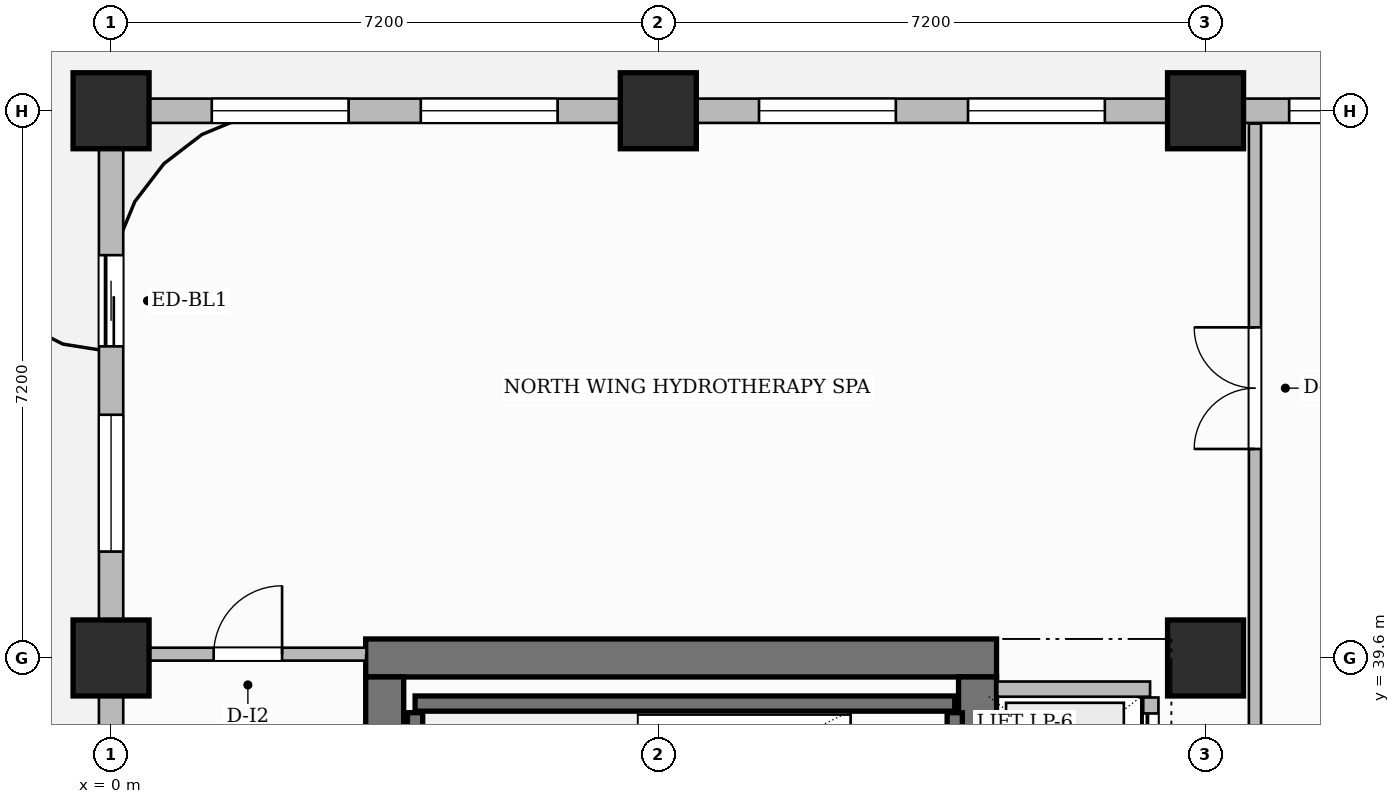
"""IFC4 building model, lengths in metres.
Left out: names, types, materials, properties, quantities, classifications, styles, units other than length and angle.
Written with IfcOpenShell. Run it as: python <this file> out.ifc"""

import sys

from ifc_helpers import new_model, si_unit, direction, frame, frame_2d, origin, origin_2d, place, context, subcontext, project, spatial, rectangle, extrude, source, transform, mapped, element, fill, save


model = new_model("IFC4")
c1 = context("Model", 3, precision=1e-05, world=origin(), true_north=direction((0.0, 1.0)))
c2 = subcontext(c1, "Body", "Model", "MODEL_VIEW")
j1 = project(units=[si_unit("LENGTHUNIT", "METRE"), si_unit("PLANEANGLEUNIT", "RADIAN")], contexts=[c1])
p1 = place(None, origin())
s1 = spatial("IfcSite", under=j1, at=p1, CompositionType="ELEMENT")
p2 = place(p1, origin())
s2 = spatial("IfcBuilding", under=s1, at=p2, CompositionType="ELEMENT")
p3 = place(p2, frame((0.0, 0.0, 184.95)))
s3 = spatial("IfcBuildingStorey", under=s2, at=p3, CompositionType="ELEMENT", Elevation=184.95)
p4 = place(p3, frame((3.35, 39.6, 0.0), z_axis=(0.0, 0.0, 1.0), x_axis=(1.0, 0.0, 0.0)))
e1 = element("IfcWall", 1, at=p4, inside=s3, PredefinedType="SHEAR", context=c2, shape_type="SweptSolid", body=[
    extrude(rectangle(XDim=8.3, YDim=0.5, at=frame_2d((4.15, 0.0))), origin(), (0.0, 0.0, 1.0), 3.85),
])
p5 = place(p3, frame((3.6, 25.45, 0.0), z_axis=(0.0, 0.0, 1.0), x_axis=(0.0, 1.0, 0.0)))
e2 = element("IfcWall", 2, at=p5, inside=s3, PredefinedType="SHEAR", context=c2, shape_type="SweptSolid", body=[
    extrude(rectangle(XDim=13.9, YDim=0.5, at=frame_2d((6.95, 0.0))), origin(), (0.0, 0.0, 1.0), 3.85),
])
p6 = place(p3, frame((11.4, 25.45, 0.0), z_axis=(0.0, 0.0, 1.0), x_axis=(0.0, 1.0, 0.0)))
e3 = element("IfcWall", 3, at=p6, inside=s3, PredefinedType="SHEAR", context=c2, shape_type="SweptSolid", body=[
    extrude(rectangle(XDim=13.9, YDim=0.5, at=frame_2d((6.95, 0.0))), origin(), (0.0, 0.0, 1.0), 3.85),
])
p7 = place(p6, frame((6.52, 0.0, 0.0)))
e4 = element("IfcOpeningElement", 4, at=p7, cuts=e3, PredefinedType="OPENING", context=c2, shape_type="SweptSolid", body=[
    extrude(rectangle(XDim=1.5, YDim=2.2, at=frame_2d((0.75, 1.1))), frame((0.0, 0.26, 0.0), z_axis=(0.0, -1.0, 0.0), x_axis=(1.0, 0.0, 0.0)), (0.0, 0.0, 1.0), 0.52),
])
m1 = source(origin(), c2, "Body", "SweptSolid", [
    extrude(rectangle(XDim=1.0, YDim=1.0, at=origin_2d()), origin(), (0.0, 0.0, 1.0), 3.85),
])
for number, where, z_axis, x_axis in (
    (5, (0.0, 39.6, 0.0), (0.0, 0.0, 1.0), (1.0, 0.0, 0.0)),
    (6, (0.0, 46.8, 0.0), (0.0, 0.0, 1.0), (1.0, 0.0, 0.0)),
    (7, (7.2, 46.8, 0.0), (0.0, 0.0, 1.0), (1.0, 0.0, 0.0)),
    (8, (14.4, 39.6, 0.0), (0.0, 0.0, 1.0), (1.0, 0.0, 0.0)),
    (9, (14.4, 46.8, 0.0), (0.0, 0.0, 1.0), (1.0, 0.0, 0.0)),
):
    element("IfcColumn", number, at=place(p3, frame(where, z_axis=z_axis, x_axis=x_axis)), inside=s3, PredefinedType="COLUMN", context=c2, shape_type="MappedRepresentation", body=[
        mapped(m1, transform((0.0, 0.0, 0.0), scale=1.0)),
    ])
p8 = place(p3, frame((4.0, 39.0, 0.0), z_axis=(0.0, 0.0, 1.0), x_axis=(1.0, 0.0, 0.0)))
e10 = element("IfcWall", 10, at=p8, inside=s3, PredefinedType="SHEAR", context=c2, shape_type="SweptSolid", body=[
    extrude(rectangle(XDim=7.1, YDim=0.2, at=frame_2d((3.55, 0.0))), origin(), (0.0, 0.0, 1.0), 3.85),
])
for number, where, z_axis, x_axis in (
    (11, (4.0, 36.18, 0.0), (0.0, 0.0, 1.0), (0.0, 1.0, 0.0)),
    (12, (11.1, 36.18, 0.0), (0.0, 0.0, 1.0), (0.0, 1.0, 0.0)),
):
    element("IfcWall", number, at=place(p3, frame(where, z_axis=z_axis, x_axis=x_axis)), inside=s3, PredefinedType="SHEAR", context=c2, shape_type="SweptSolid", body=[
        extrude(rectangle(XDim=2.7, YDim=0.2, at=frame_2d((1.35, 0.0))), origin(), (0.0, 0.0, 1.0), 3.85),
    ])
p9 = place(p3, frame((11.66, 39.19, 0.0), z_axis=(0.0, 0.0, 1.0), x_axis=(1.0, 0.0, 0.0)))
e13 = element("IfcWall", 13, at=p9, inside=s3, PredefinedType="PARTITIONING", context=c2, shape_type="SweptSolid", body=[
    extrude(rectangle(XDim=2.01, YDim=0.2, at=frame_2d((1.005, 0.0))), origin(), (0.0, 0.0, 1.0), 3.6),
])
p10 = place(p3, frame((13.68, 34.36, 0.0), z_axis=(0.0, 0.0, 1.0), x_axis=(0.0, 1.0, 0.0)))
e14 = element("IfcWall", 14, at=p10, inside=s3, PredefinedType="PARTITIONING", context=c2, shape_type="SweptSolid", body=[
    extrude(rectangle(XDim=4.72, YDim=0.2, at=frame_2d((2.36, 0.0))), origin(), (0.0, 0.0, 1.0), 3.6),
])
p11 = place(p10, frame((0.21, 0.0, 0.0)))
e15 = element("IfcOpeningElement", 15, at=p11, cuts=e14, PredefinedType="OPENING", context=c2, shape_type="SweptSolid", body=[
    extrude(rectangle(XDim=1.1, YDim=2.2, at=frame_2d((0.55, 1.1))), frame((0.0, 0.11, 0.0), z_axis=(0.0, -1.0, 0.0), x_axis=(1.0, 0.0, 0.0)), (0.0, 0.0, 1.0), 0.22),
])
p12 = place(p10, frame((1.81, 0.0, 0.0)))
e16 = element("IfcOpeningElement", 16, at=p12, cuts=e14, PredefinedType="OPENING", context=c2, shape_type="SweptSolid", body=[
    extrude(rectangle(XDim=1.1, YDim=2.2, at=frame_2d((0.55, 1.1))), frame((0.0, 0.11, 0.0), z_axis=(0.0, -1.0, 0.0), x_axis=(1.0, 0.0, 0.0)), (0.0, 0.0, 1.0), 0.22),
])
p13 = place(p10, frame((3.41, 0.0, 0.0)))
e17 = element("IfcOpeningElement", 17, at=p13, cuts=e14, PredefinedType="OPENING", context=c2, shape_type="SweptSolid", body=[
    extrude(rectangle(XDim=1.1, YDim=2.2, at=frame_2d((0.55, 1.1))), frame((0.0, 0.11, 0.0), z_axis=(0.0, -1.0, 0.0), x_axis=(1.0, 0.0, 0.0)), (0.0, 0.0, 1.0), 0.22),
])
p14 = place(p3, frame((0.24, 39.65, 0.0), z_axis=(0.0, 0.0, 1.0), x_axis=(1.0, 0.0, 0.0)))
e18 = element("IfcWall", 18, at=p14, inside=s3, PredefinedType="PARTITIONING", context=c2, shape_type="SweptSolid", body=[
    extrude(rectangle(XDim=3.12, YDim=0.17, at=frame_2d((1.56, 0.0))), origin(), (0.0, 0.0, 1.0), 3.6),
])
p15 = place(p14, frame((1.11, 0.0, 0.0)))
e19 = element("IfcOpeningElement", 19, at=p15, cuts=e18, PredefinedType="OPENING", context=c2, shape_type="SweptSolid", body=[
    extrude(rectangle(XDim=0.9, YDim=2.15, at=frame_2d((0.45, 1.075))), frame((0.0, 0.095, 0.0), z_axis=(0.0, -1.0, 0.0), x_axis=(1.0, 0.0, 0.0)), (0.0, 0.0, 1.0), 0.19),
])
p16 = place(p3, frame((15.05, 34.34, 0.0), z_axis=(0.0, 0.0, 1.0), x_axis=(0.0, 1.0, 0.0)))
e20 = element("IfcWall", 20, at=p16, inside=s3, PredefinedType="PARTITIONING", context=c2, shape_type="SweptSolid", body=[
    extrude(rectangle(XDim=12.292, YDim=0.16, at=frame_2d((6.146, 0.0))), origin(), (0.0, 0.0, 1.0), 3.6),
])
p17 = place(p16, frame((8.01, 0.0, 0.0)))
e21 = element("IfcOpeningElement", 21, at=p17, cuts=e20, PredefinedType="OPENING", context=c2, shape_type="SweptSolid", body=[
    extrude(rectangle(XDim=1.6, YDim=2.4, at=frame_2d((0.8, 1.2))), frame((0.0, 0.09, 0.0), z_axis=(0.0, -1.0, 0.0), x_axis=(1.0, 0.0, 0.0)), (0.0, 0.0, 1.0), 0.18),
])
p18 = place(p3, frame((0.0, 25.25, 0.0), z_axis=(0.0, 0.0, 1.0), x_axis=(0.0, 1.0, 0.0)))
e22 = element("IfcWall", 22, at=p18, inside=s3, PredefinedType="SOLIDWALL", context=c2, shape_type="SweptSolid", body=[
    extrude(rectangle(XDim=21.5, YDim=0.32, at=frame_2d((10.75, 0.0))), origin(), (0.0, 0.0, 1.0), 3.085),
])
p19 = place(p18, frame((18.45, 0.0, 0.0)))
e23 = element("IfcOpeningElement", 23, at=p19, cuts=e22, PredefinedType="OPENING", context=c2, shape_type="SweptSolid", body=[
    extrude(rectangle(XDim=1.2, YDim=2.2, at=frame_2d((0.6, 1.1))), frame((0.0, 0.17, 0.0), z_axis=(0.0, -1.0, 0.0), x_axis=(1.0, 0.0, 0.0)), (0.0, 0.0, 1.0), 0.34),
])
p20 = place(p18, frame((0.8, 0.0, 0.0)))
e24 = element("IfcOpeningElement", 24, at=p20, cuts=e22, PredefinedType="OPENING", context=c2, shape_type="SweptSolid", body=[
    extrude(rectangle(XDim=1.2, YDim=2.2, at=frame_2d((0.6, 1.1))), frame((0.0, 0.17, 0.0), z_axis=(0.0, -1.0, 0.0), x_axis=(1.0, 0.0, 0.0)), (0.0, 0.0, 1.0), 0.34),
])
p21 = place(p18, frame((3.425, 0.0, 0.8)))
e25 = element("IfcOpeningElement", 25, at=p21, cuts=e22, PredefinedType="OPENING", context=c2, shape_type="SweptSolid", body=[
    extrude(rectangle(XDim=1.8, YDim=1.85, at=frame_2d((0.9, 0.925))), frame((0.0, 0.17, 0.0), z_axis=(0.0, -1.0, 0.0), x_axis=(1.0, 0.0, 0.0)), (0.0, 0.0, 1.0), 0.34),
])
p22 = place(p18, frame((8.475, 0.0, 0.8)))
e26 = element("IfcOpeningElement", 26, at=p22, cuts=e22, PredefinedType="OPENING", context=c2, shape_type="SweptSolid", body=[
    extrude(rectangle(XDim=1.8, YDim=1.85, at=frame_2d((0.9, 0.925))), frame((0.0, 0.17, 0.0), z_axis=(0.0, -1.0, 0.0), x_axis=(1.0, 0.0, 0.0)), (0.0, 0.0, 1.0), 0.34),
])
p23 = place(p18, frame((11.225, 0.0, 0.8)))
e27 = element("IfcOpeningElement", 27, at=p23, cuts=e22, PredefinedType="OPENING", context=c2, shape_type="SweptSolid", body=[
    extrude(rectangle(XDim=1.8, YDim=1.85, at=frame_2d((0.9, 0.925))), frame((0.0, 0.17, 0.0), z_axis=(0.0, -1.0, 0.0), x_axis=(1.0, 0.0, 0.0)), (0.0, 0.0, 1.0), 0.34),
])
p24 = place(p18, frame((15.75, 0.0, 0.8)))
e28 = element("IfcOpeningElement", 28, at=p24, cuts=e22, PredefinedType="OPENING", context=c2, shape_type="SweptSolid", body=[
    extrude(rectangle(XDim=1.8, YDim=1.85, at=frame_2d((0.9, 0.925))), frame((0.0, 0.17, 0.0), z_axis=(0.0, -1.0, 0.0), x_axis=(1.0, 0.0, 0.0)), (0.0, 0.0, 1.0), 0.34),
])
p25 = place(p3, frame((0.0, 46.8, 0.0), z_axis=(0.0, 0.0, 1.0), x_axis=(1.0, 0.0, 0.0)))
e29 = element("IfcWall", 29, at=p25, inside=s3, PredefinedType="SOLIDWALL", context=c2, shape_type="SweptSolid", body=[
    extrude(rectangle(XDim=18.0, YDim=0.32, at=frame_2d((9.0, 0.0))), origin(), (0.0, 0.0, 1.0), 3.085),
])
p26 = place(p25, frame((1.325, 0.0, 0.8)))
e30 = element("IfcOpeningElement", 30, at=p26, cuts=e29, PredefinedType="OPENING", context=c2, shape_type="SweptSolid", body=[
    extrude(rectangle(XDim=1.8, YDim=1.85, at=frame_2d((0.9, 0.925))), frame((0.0, 0.17, 0.0), z_axis=(0.0, -1.0, 0.0), x_axis=(1.0, 0.0, 0.0)), (0.0, 0.0, 1.0), 0.34),
])
p27 = place(p25, frame((4.075, 0.0, 0.8)))
e31 = element("IfcOpeningElement", 31, at=p27, cuts=e29, PredefinedType="OPENING", context=c2, shape_type="SweptSolid", body=[
    extrude(rectangle(XDim=1.8, YDim=1.85, at=frame_2d((0.9, 0.925))), frame((0.0, 0.17, 0.0), z_axis=(0.0, -1.0, 0.0), x_axis=(1.0, 0.0, 0.0)), (0.0, 0.0, 1.0), 0.34),
])
p28 = place(p25, frame((8.525, 0.0, 0.8)))
e32 = element("IfcOpeningElement", 32, at=p28, cuts=e29, PredefinedType="OPENING", context=c2, shape_type="SweptSolid", body=[
    extrude(rectangle(XDim=1.8, YDim=1.85, at=frame_2d((0.9, 0.925))), frame((0.0, 0.17, 0.0), z_axis=(0.0, -1.0, 0.0), x_axis=(1.0, 0.0, 0.0)), (0.0, 0.0, 1.0), 0.34),
])
p29 = place(p25, frame((11.275, 0.0, 0.8)))
e33 = element("IfcOpeningElement", 33, at=p29, cuts=e29, PredefinedType="OPENING", context=c2, shape_type="SweptSolid", body=[
    extrude(rectangle(XDim=1.8, YDim=1.85, at=frame_2d((0.9, 0.925))), frame((0.0, 0.17, 0.0), z_axis=(0.0, -1.0, 0.0), x_axis=(1.0, 0.0, 0.0)), (0.0, 0.0, 1.0), 0.34),
])
p30 = place(p25, frame((15.5, 0.0, 0.8)))
e34 = element("IfcOpeningElement", 34, at=p30, cuts=e29, PredefinedType="OPENING", context=c2, shape_type="SweptSolid", body=[
    extrude(rectangle(XDim=1.4, YDim=1.85, at=frame_2d((0.7, 0.925))), frame((0.0, 0.17, 0.0), z_axis=(0.0, -1.0, 0.0), x_axis=(1.0, 0.0, 0.0)), (0.0, 0.0, 1.0), 0.34),
])
m2 = source(origin(), c2, "Body", "SweptSolid", [
    extrude(rectangle(XDim=0.9, YDim=2.15, at=frame_2d((0.45, 1.075))), frame((0.0, 0.025, 0.0), z_axis=(0.0, -1.0, 0.0), x_axis=(1.0, 0.0, 0.0)), (0.0, 0.0, 1.0), 0.05),
])
p31 = place(p15, origin())
e35 = element("IfcDoor", 35, at=p31, inside=s3, OperationType="SINGLE_SWING_RIGHT", PredefinedType="DOOR", context=c2, shape_type="MappedRepresentation", body=[
    mapped(m2, transform((0.0, 0.0, 0.0), scale=1.0)),
])
fill(e19, e35)
m3 = source(origin(), c2, "Body", "SweptSolid", [
    extrude(rectangle(XDim=1.6, YDim=2.4, at=frame_2d((0.8, 1.2))), frame((0.0, 0.025, 0.0), z_axis=(0.0, -1.0, 0.0), x_axis=(1.0, 0.0, 0.0)), (0.0, 0.0, 1.0), 0.05),
])
p32 = place(p17, origin())
e36 = element("IfcDoor", 36, at=p32, inside=s3, OperationType="DOUBLE_DOOR_SINGLE_SWING", PredefinedType="DOOR", context=c2, shape_type="MappedRepresentation", body=[
    mapped(m3, transform((0.0, 0.0, 0.0), scale=1.0)),
])
fill(e21, e36)
m4 = source(origin(), c2, "Body", "SweptSolid", [
    extrude(rectangle(XDim=1.1, YDim=2.2, at=frame_2d((0.55, 1.1))), frame((0.0, 0.025, 0.0), z_axis=(0.0, -1.0, 0.0), x_axis=(1.0, 0.0, 0.0)), (0.0, 0.0, 1.0), 0.05),
])
p33 = place(p13, origin())
e37 = element("IfcDoor", 37, at=p33, inside=s3, OperationType="SLIDING_TO_LEFT", PredefinedType="DOOR", context=c2, shape_type="MappedRepresentation", body=[
    mapped(m4, transform((0.0, 0.0, 0.0), scale=1.0)),
])
fill(e17, e37)
m5 = source(origin(), c2, "Body", "SweptSolid", [
    extrude(rectangle(XDim=1.2, YDim=2.2, at=frame_2d((0.6, 1.1))), frame((0.0, 0.025, 0.0), z_axis=(0.0, -1.0, 0.0), x_axis=(1.0, 0.0, 0.0)), (0.0, 0.0, 1.0), 0.05),
])
p34 = place(p19, origin())
e38 = element("IfcDoor", 38, at=p34, inside=s3, OperationType="SLIDING_TO_LEFT", PredefinedType="DOOR", context=c2, shape_type="MappedRepresentation", body=[
    mapped(m5, transform((0.0, 0.0, 0.0), scale=1.0)),
])
fill(e23, e38)
m6 = source(origin(), c2, "Body", "SweptSolid", [
    extrude(rectangle(XDim=1.8, YDim=1.85, at=frame_2d((0.9, 0.925))), frame((0.0, 0.03, 0.0), z_axis=(0.0, -1.0, 0.0), x_axis=(1.0, 0.0, 0.0)), (0.0, 0.0, 1.0), 0.06),
])
p35 = place(p24, origin())
e39 = element("IfcWindow", 39, at=p35, inside=s3, PartitioningType="DOUBLE_PANEL_VERTICAL", PredefinedType="WINDOW", context=c2, shape_type="MappedRepresentation", body=[
    mapped(m6, transform((0.0, 0.0, 0.0), scale=1.0)),
])
fill(e28, e39)
p36 = place(p26, origin())
e40 = element("IfcWindow", 40, at=p36, inside=s3, PartitioningType="DOUBLE_PANEL_VERTICAL", PredefinedType="WINDOW", context=c2, shape_type="MappedRepresentation", body=[
    mapped(m6, transform((0.0, 0.0, 0.0), scale=1.0)),
])
fill(e30, e40)
p37 = place(p27, origin())
e41 = element("IfcWindow", 41, at=p37, inside=s3, PartitioningType="DOUBLE_PANEL_VERTICAL", PredefinedType="WINDOW", context=c2, shape_type="MappedRepresentation", body=[
    mapped(m6, transform((0.0, 0.0, 0.0), scale=1.0)),
])
fill(e31, e41)
p38 = place(p28, origin())
e42 = element("IfcWindow", 42, at=p38, inside=s3, PartitioningType="DOUBLE_PANEL_VERTICAL", PredefinedType="WINDOW", context=c2, shape_type="MappedRepresentation", body=[
    mapped(m6, transform((0.0, 0.0, 0.0), scale=1.0)),
])
fill(e32, e42)
p39 = place(p29, origin())
e43 = element("IfcWindow", 43, at=p39, inside=s3, PartitioningType="DOUBLE_PANEL_VERTICAL", PredefinedType="WINDOW", context=c2, shape_type="MappedRepresentation", body=[
    mapped(m6, transform((0.0, 0.0, 0.0), scale=1.0)),
])
fill(e33, e43)
m7 = source(origin(), c2, "Body", "SweptSolid", [
    extrude(rectangle(XDim=1.4, YDim=1.85, at=frame_2d((0.7, 0.925))), frame((0.0, 0.03, 0.0), z_axis=(0.0, -1.0, 0.0), x_axis=(1.0, 0.0, 0.0)), (0.0, 0.0, 1.0), 0.06),
])
p40 = place(p30, origin())
e44 = element("IfcWindow", 44, at=p40, inside=s3, PartitioningType="SINGLE_PANEL", PredefinedType="WINDOW", context=c2, shape_type="MappedRepresentation", body=[
    mapped(m7, transform((0.0, 0.0, 0.0), scale=1.0)),
])
fill(e34, e44)
save(model, sys.argv[1])
